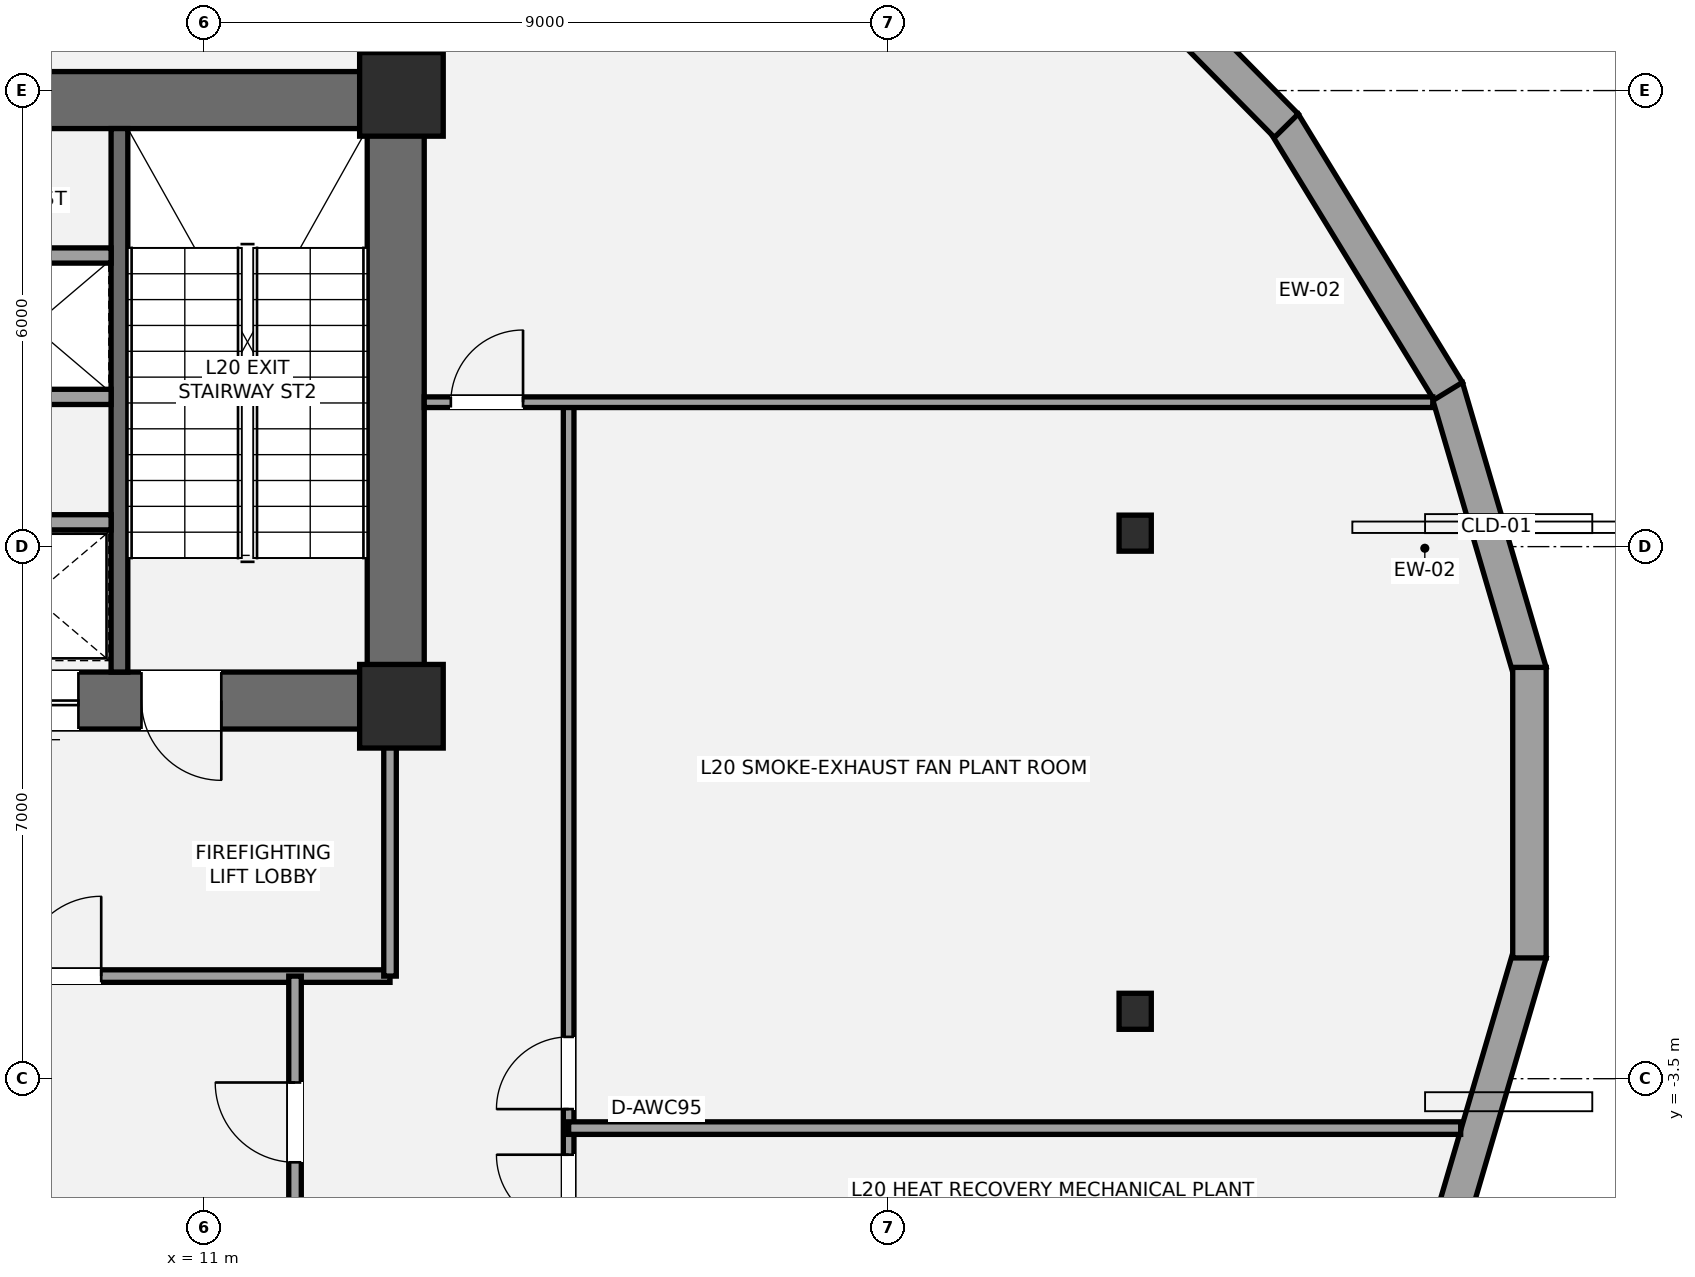
"""IFC4 building model, lengths in metres.
Left out: names, types, materials, properties, quantities, classifications, styles, units other than length and angle.
Written with IfcOpenShell. Run it as: python <this file> out.ifc"""

import sys

from ifc_helpers import new_model, si_unit, direction, frame, frame_2d, origin, origin_2d, place, context, subcontext, project, spatial, rectangle, i_section, extrude, element, fill, save


model = new_model("IFC4")
c1 = context("Model", 3, precision=1e-05, world=origin(), true_north=direction((0.0, 1.0)))
c2 = subcontext(c1, "Body", "Model", "MODEL_VIEW")
j1 = project(units=[si_unit("LENGTHUNIT", "METRE"), si_unit("PLANEANGLEUNIT", "RADIAN")], contexts=[c1])
p1 = place(None, origin())
s1 = spatial("IfcSite", under=j1, at=p1, CompositionType="ELEMENT")
p2 = place(p1, origin())
s2 = spatial("IfcBuilding", under=s1, at=p2, CompositionType="ELEMENT")
p3 = place(p2, frame((0.0, 0.0, 77.4)))
s3 = spatial("IfcBuildingStorey", under=s2, at=p3, CompositionType="ELEMENT", Elevation=77.4)
p4 = place(p3, frame((13.525, 1.1, 0.0), z_axis=(0.0, 0.0, 1.0), x_axis=(0.0, 1.0, 0.0)))
e1 = element("IfcWall", 1, at=p4, inside=s3, PredefinedType="SHEAR", context=c2, shape_type="SweptSolid", body=[
    extrude(rectangle(XDim=8.65, YDim=0.75, at=frame_2d((4.325, 0.0))), origin(), (0.0, 0.0, 1.0), 4.5),
])
p5 = place(p3, frame((4.425, 9.375, 0.0), z_axis=(0.0, 0.0, 1.0), x_axis=(1.0, 0.0, 0.0)))
e2 = element("IfcWall", 2, at=p5, inside=s3, PredefinedType="SHEAR", context=c2, shape_type="SweptSolid", body=[
    extrude(rectangle(XDim=9.475, YDim=0.75, at=frame_2d((4.737, 0.0))), origin(), (0.0, 0.0, 1.0), 4.5),
])
p6 = place(p3, frame((13.9, 1.475, 0.0), z_axis=(0.0, 0.0, 1.0), x_axis=(-1.0, 0.0, 0.0)))
e3 = element("IfcWall", 3, at=p6, inside=s3, PredefinedType="SHEAR", context=c2, shape_type="SweptSolid", body=[
    extrude(rectangle(XDim=9.075, YDim=0.75, at=frame_2d((4.538, 0.0))), origin(), (0.0, 0.0, 1.0), 4.5),
])
p7 = place(p6, frame((2.67, 0.0, 0.0)))
e4 = element("IfcOpeningElement", 4, at=p7, cuts=e3, PredefinedType="OPENING", context=c2, shape_type="SweptSolid", body=[
    extrude(rectangle(XDim=1.05, YDim=2.15, at=frame_2d((0.525, 1.075))), frame((0.0, 0.385, 0.0), z_axis=(0.0, -1.0, 0.0), x_axis=(1.0, 0.0, 0.0)), (0.0, 0.0, 1.0), 0.77),
])
p8 = place(p6, frame((4.55, 0.0, 0.0)))
e5 = element("IfcOpeningElement", 5, at=p8, cuts=e3, PredefinedType="OPENING", context=c2, shape_type="SweptSolid", body=[
    extrude(rectangle(XDim=1.1, YDim=2.2, at=frame_2d((0.55, 1.1))), frame((0.0, 0.385, 0.0), z_axis=(0.0, -1.0, 0.0), x_axis=(1.0, 0.0, 0.0)), (0.0, 0.0, 1.0), 0.77),
])
p9 = place(p3, frame((9.89, 1.85, 0.0), z_axis=(0.0, 0.0, 1.0), x_axis=(0.0, 1.0, 0.0)))
e6 = element("IfcWall", 6, at=p9, inside=s3, PredefinedType="SHEAR", context=c2, shape_type="SweptSolid", body=[
    extrude(rectangle(XDim=7.15, YDim=0.22, at=frame_2d((3.575, 0.0))), origin(), (0.0, 0.0, 1.0), 4.5),
])
for number, where, z_axis, x_axis in (
    (7, (13.6, 1.4, 0.0), (0.0, 0.0, 1.0), (1.0, 0.0, 0.0)),
    (8, (13.6, 9.45, 0.0), (0.0, 0.0, 1.0), (1.0, 0.0, 0.0)),
):
    element("IfcColumn", number, at=place(p3, frame(where, z_axis=z_axis, x_axis=x_axis)), inside=s3, PredefinedType="COLUMN", context=c2, shape_type="SweptSolid", body=[
        extrude(rectangle(XDim=1.1, YDim=1.1, at=origin_2d()), origin(), (0.0, 0.0, 1.0), 4.5),
    ])
for number, where, z_axis, x_axis in (
    (9, (23.254, 3.677, 0.0), (0.0, 0.0, 1.0), (1.0, 0.0, 0.0)),
    (10, (23.254, -2.613, 0.0), (0.0, 0.0, 1.0), (1.0, 0.0, 0.0)),
):
    element("IfcColumn", number, at=place(p3, frame(where, z_axis=z_axis, x_axis=x_axis)), inside=s3, PredefinedType="COLUMN", context=c2, shape_type="SweptSolid", body=[
        extrude(i_section(OverallWidth=0.424, OverallDepth=0.474, WebThickness=0.048, FlangeThickness=0.077, at=origin_2d()), origin(), (0.0, 0.0, 1.0), 4.5),
    ])
p10 = place(p3, frame((27.349, 5.599, 0.0), z_axis=(0.0, 0.0, 1.0), x_axis=(0.281834819638, -0.959462940629, 0.0)))
e11 = element("IfcWall", 11, at=p10, inside=s3, PredefinedType="STANDARD", context=c2, shape_type="SweptSolid", body=[
    extrude(rectangle(XDim=3.908, YDim=0.44, at=frame_2d((1.954, 0.0))), origin(), (0.0, 0.0, 1.0), 3.498),
])
p11 = place(p3, frame((25.212, 9.077, 0.0), z_axis=(0.0, 0.0, 1.0), x_axis=(0.521891226532, -0.85301204427, 0.0)))
e12 = element("IfcWall", 12, at=p11, inside=s3, PredefinedType="STANDARD", context=c2, shape_type="SweptSolid", body=[
    extrude(rectangle(XDim=4.14, YDim=0.44, at=frame_2d((2.07, 0.0))), origin(), (0.0, 0.0, 1.0), 3.498),
])
p12 = place(p3, frame((22.106, 12.216, 0.0), z_axis=(0.0, 0.0, 1.0), x_axis=(0.702361901729, -0.711820032733, 0.0)))
e13 = element("IfcWall", 13, at=p12, inside=s3, PredefinedType="STANDARD", context=c2, shape_type="SweptSolid", body=[
    extrude(rectangle(XDim=4.466, YDim=0.44, at=frame_2d((2.233, 0.0))), origin(), (0.0, 0.0, 1.0), 3.498),
])
p13 = place(p3, frame((28.45, -1.849, 0.0), z_axis=(0.0, 0.0, 1.0), x_axis=(-0.281834819638, -0.959462940629, 0.0)))
e14 = element("IfcWall", 14, at=p13, inside=s3, PredefinedType="STANDARD", context=c2, shape_type="SweptSolid", body=[
    extrude(rectangle(XDim=3.908, YDim=0.44, at=frame_2d((1.954, 0.0))), origin(), (0.0, 0.0, 1.0), 3.498),
])
p14 = place(p3, frame((28.441, 1.911, 0.0), z_axis=(0.0, 0.0, 1.0), x_axis=(0.0, -1.0, 0.0)))
e15 = element("IfcWall", 15, at=p14, inside=s3, PredefinedType="STANDARD", context=c2, shape_type="SweptSolid", body=[
    extrude(rectangle(XDim=3.823, YDim=0.44, at=frame_2d((1.911, 0.0))), origin(), (0.0, 0.0, 1.0), 3.498),
])
p15 = place(p3, frame((7.2, -2.15, 0.0), z_axis=(0.0, 0.0, 1.0), x_axis=(1.0, 0.0, 0.0)))
e16 = element("IfcWall", 16, at=p15, inside=s3, PredefinedType="PARTITIONING", context=c2, shape_type="SweptSolid", body=[
    extrude(rectangle(XDim=6.25, YDim=0.165, at=frame_2d((3.125, 0.0))), origin(), (0.0, 0.0, 1.0), 4.28),
])
p16 = place(p15, frame((1.4, 0.0, 0.0)))
e17 = element("IfcOpeningElement", 17, at=p16, cuts=e16, PredefinedType="OPENING", context=c2, shape_type="SweptSolid", body=[
    extrude(rectangle(XDim=1.05, YDim=2.15, at=frame_2d((0.525, 1.075))), frame((0.0, 0.093, 0.0), z_axis=(0.0, -1.0, 0.0), x_axis=(1.0, 0.0, 0.0)), (0.0, 0.0, 1.0), 0.185),
])
p17 = place(p3, frame((13.45, -2.15, 0.0), z_axis=(0.0, 0.0, 1.0), x_axis=(0.0, 1.0, 0.0)))
e18 = element("IfcWall", 18, at=p17, inside=s3, PredefinedType="PARTITIONING", context=c2, shape_type="SweptSolid", body=[
    extrude(rectangle(XDim=3.3, YDim=0.165, at=frame_2d((1.65, 0.0))), origin(), (0.0, 0.0, 1.0), 2.47),
])
p18 = place(p3, frame((5.575, 3.82, 0.0), z_axis=(0.0, 0.0, 1.0), x_axis=(1.0, 0.0, 0.0)))
e19 = element("IfcWall", 19, at=p18, inside=s3, PredefinedType="SOLIDWALL", context=c2, shape_type="SweptSolid", body=[
    extrude(rectangle(XDim=4.205, YDim=0.2, at=frame_2d((2.103, 0.0))), origin(), (0.0, 0.0, 1.0), 4.28),
])
p19 = place(p18, frame((0.65, 0.0, 0.0)))
e20 = element("IfcOpeningElement", 20, at=p19, cuts=e19, PredefinedType="OPENING", context=c2, shape_type="SweptSolid", body=[
    extrude(rectangle(XDim=1.2, YDim=2.2, at=frame_2d((0.6, 1.1))), frame((0.0, 0.11, 0.0), z_axis=(0.0, -1.0, 0.0), x_axis=(1.0, 0.0, 0.0)), (0.0, 0.0, 1.0), 0.22),
])
for number, where, z_axis, x_axis in (
    (21, (5.575, 5.47, 0.0), (0.0, 0.0, 1.0), (1.0, 0.0, 0.0)),
    (22, (5.575, 7.33, 0.0), (0.0, 0.0, 1.0), (1.0, 0.0, 0.0)),
):
    element("IfcWall", number, at=place(p3, frame(where, z_axis=z_axis, x_axis=x_axis)), inside=s3, PredefinedType="SOLIDWALL", context=c2, shape_type="SweptSolid", body=[
        extrude(rectangle(XDim=4.205, YDim=0.2, at=frame_2d((2.103, 0.0))), origin(), (0.0, 0.0, 1.0), 4.28),
    ])
p20 = place(p3, frame((12.2, -5.8, 0.0), z_axis=(0.0, 0.0, 1.0), x_axis=(0.0, 1.0, 0.0)))
e23 = element("IfcWall", 23, at=p20, inside=s3, PredefinedType="PARTITIONING", context=c2, shape_type="SweptSolid", body=[
    extrude(rectangle(XDim=3.65, YDim=0.165, at=frame_2d((1.825, 0.0))), origin(), (0.0, 0.0, 1.0), 3.733),
])
p21 = place(p20, frame((1.2, 0.0, 0.0)))
e24 = element("IfcOpeningElement", 24, at=p21, cuts=e23, PredefinedType="OPENING", context=c2, shape_type="SweptSolid", body=[
    extrude(rectangle(XDim=1.05, YDim=2.15, at=frame_2d((0.525, 1.075))), frame((0.0, 0.093, 0.0), z_axis=(0.0, -1.0, 0.0), x_axis=(1.0, 0.0, 0.0)), (0.0, 0.0, 1.0), 0.185),
])
p22 = place(p3, frame((15.8, -5.8, 0.0), z_axis=(0.0, 0.0, 1.0), x_axis=(0.0, 1.0, 0.0)))
e25 = element("IfcWall", 25, at=p22, inside=s3, PredefinedType="PARTITIONING", context=c2, shape_type="SweptSolid", body=[
    extrude(rectangle(XDim=11.2, YDim=0.14, at=frame_2d((5.6, 0.0))), origin(), (0.0, 0.0, 1.0), 2.47),
])
p23 = place(p22, frame((0.35, 0.0, 0.0)))
e26 = element("IfcOpeningElement", 26, at=p23, cuts=e25, PredefinedType="OPENING", context=c2, shape_type="SweptSolid", body=[
    extrude(rectangle(XDim=0.95, YDim=2.15, at=frame_2d((0.475, 1.075))), frame((0.0, 0.08, 0.0), z_axis=(0.0, -1.0, 0.0), x_axis=(1.0, 0.0, 0.0)), (0.0, 0.0, 1.0), 0.16),
])
p24 = place(p22, frame((1.9, 0.0, 0.0)))
e27 = element("IfcOpeningElement", 27, at=p24, cuts=e25, PredefinedType="OPENING", context=c2, shape_type="SweptSolid", body=[
    extrude(rectangle(XDim=0.95, YDim=2.15, at=frame_2d((0.475, 1.075))), frame((0.0, 0.08, 0.0), z_axis=(0.0, -1.0, 0.0), x_axis=(1.0, 0.0, 0.0)), (0.0, 0.0, 1.0), 0.16),
])
p25 = place(p3, frame((13.9, 5.4, 0.0), z_axis=(0.0, 0.0, 1.0), x_axis=(1.0, 0.0, 0.0)))
e28 = element("IfcWall", 28, at=p25, inside=s3, PredefinedType="PARTITIONING", context=c2, shape_type="SweptSolid", body=[
    extrude(rectangle(XDim=13.27, YDim=0.14, at=frame_2d((6.635, 0.0))), origin(), (0.0, 0.0, 1.0), 3.733),
])
p26 = place(p25, frame((0.35, 0.0, 0.0)))
e29 = element("IfcOpeningElement", 29, at=p26, cuts=e28, PredefinedType="OPENING", context=c2, shape_type="SweptSolid", body=[
    extrude(rectangle(XDim=0.95, YDim=2.15, at=frame_2d((0.475, 1.075))), frame((0.0, 0.08, 0.0), z_axis=(0.0, -1.0, 0.0), x_axis=(1.0, 0.0, 0.0)), (0.0, 0.0, 1.0), 0.16),
])
p27 = place(p3, frame((15.8, -4.15, 0.0), z_axis=(0.0, 0.0, 1.0), x_axis=(1.0, 0.0, 0.0)))
e30 = element("IfcWall", 30, at=p27, inside=s3, PredefinedType="PARTITIONING", context=c2, shape_type="SweptSolid", body=[
    extrude(rectangle(XDim=11.737, YDim=0.165, at=frame_2d((5.868, 0.0))), origin(), (0.0, 0.0, 1.0), 2.47),
])
p28 = place(p7, origin())
e31 = element("IfcDoor", 31, at=p28, inside=s3, OperationType="SINGLE_SWING_LEFT", PredefinedType="DOOR", context=c2, shape_type="SweptSolid", body=[
    extrude(rectangle(XDim=1.05, YDim=2.15, at=frame_2d((0.525, 1.075))), frame((0.0, 0.025, 0.0), z_axis=(0.0, -1.0, 0.0), x_axis=(1.0, 0.0, 0.0)), (0.0, 0.0, 1.0), 0.05),
])
fill(e4, e31)
p29 = place(p8, origin())
e32 = element("IfcDoor", 32, at=p29, inside=s3, OperationType="SLIDING_TO_LEFT", PredefinedType="DOOR", context=c2, shape_type="SweptSolid", body=[
    extrude(rectangle(XDim=1.1, YDim=2.2, at=frame_2d((0.55, 1.1))), frame((0.0, 0.025, 0.0), z_axis=(0.0, -1.0, 0.0), x_axis=(1.0, 0.0, 0.0)), (0.0, 0.0, 1.0), 0.05),
])
fill(e5, e32)
p30 = place(p16, origin())
e33 = element("IfcDoor", 33, at=p30, inside=s3, OperationType="SINGLE_SWING_RIGHT", PredefinedType="DOOR", context=c2, shape_type="SweptSolid", body=[
    extrude(rectangle(XDim=1.05, YDim=2.15, at=frame_2d((0.525, 1.075))), frame((0.0, 0.025, 0.0), z_axis=(0.0, -1.0, 0.0), x_axis=(1.0, 0.0, 0.0)), (0.0, 0.0, 1.0), 0.05),
])
fill(e17, e33)
p31 = place(p21, origin())
e34 = element("IfcDoor", 34, at=p31, inside=s3, OperationType="SINGLE_SWING_RIGHT", PredefinedType="DOOR", context=c2, shape_type="SweptSolid", body=[
    extrude(rectangle(XDim=1.05, YDim=2.15, at=frame_2d((0.525, 1.075))), frame((0.0, 0.025, 0.0), z_axis=(0.0, -1.0, 0.0), x_axis=(1.0, 0.0, 0.0)), (0.0, 0.0, 1.0), 0.05),
])
fill(e24, e34)
p32 = place(p23, origin())
e35 = element("IfcDoor", 35, at=p32, inside=s3, OperationType="SINGLE_SWING_RIGHT", PredefinedType="DOOR", context=c2, shape_type="SweptSolid", body=[
    extrude(rectangle(XDim=0.95, YDim=2.15, at=frame_2d((0.475, 1.075))), frame((0.0, 0.025, 0.0), z_axis=(0.0, -1.0, 0.0), x_axis=(1.0, 0.0, 0.0)), (0.0, 0.0, 1.0), 0.05),
])
fill(e26, e35)
p33 = place(p24, origin())
e36 = element("IfcDoor", 36, at=p33, inside=s3, OperationType="SINGLE_SWING_LEFT", PredefinedType="DOOR", context=c2, shape_type="SweptSolid", body=[
    extrude(rectangle(XDim=0.95, YDim=2.15, at=frame_2d((0.475, 1.075))), frame((0.0, 0.025, 0.0), z_axis=(0.0, -1.0, 0.0), x_axis=(1.0, 0.0, 0.0)), (0.0, 0.0, 1.0), 0.05),
])
fill(e27, e36)
p34 = place(p26, origin())
e37 = element("IfcDoor", 37, at=p34, inside=s3, OperationType="SINGLE_SWING_RIGHT", PredefinedType="DOOR", context=c2, shape_type="SweptSolid", body=[
    extrude(rectangle(XDim=0.95, YDim=2.15, at=frame_2d((0.475, 1.075))), frame((0.0, 0.025, 0.0), z_axis=(0.0, -1.0, 0.0), x_axis=(1.0, 0.0, 0.0)), (0.0, 0.0, 1.0), 0.05),
])
fill(e29, e37)
save(model, sys.argv[1])
